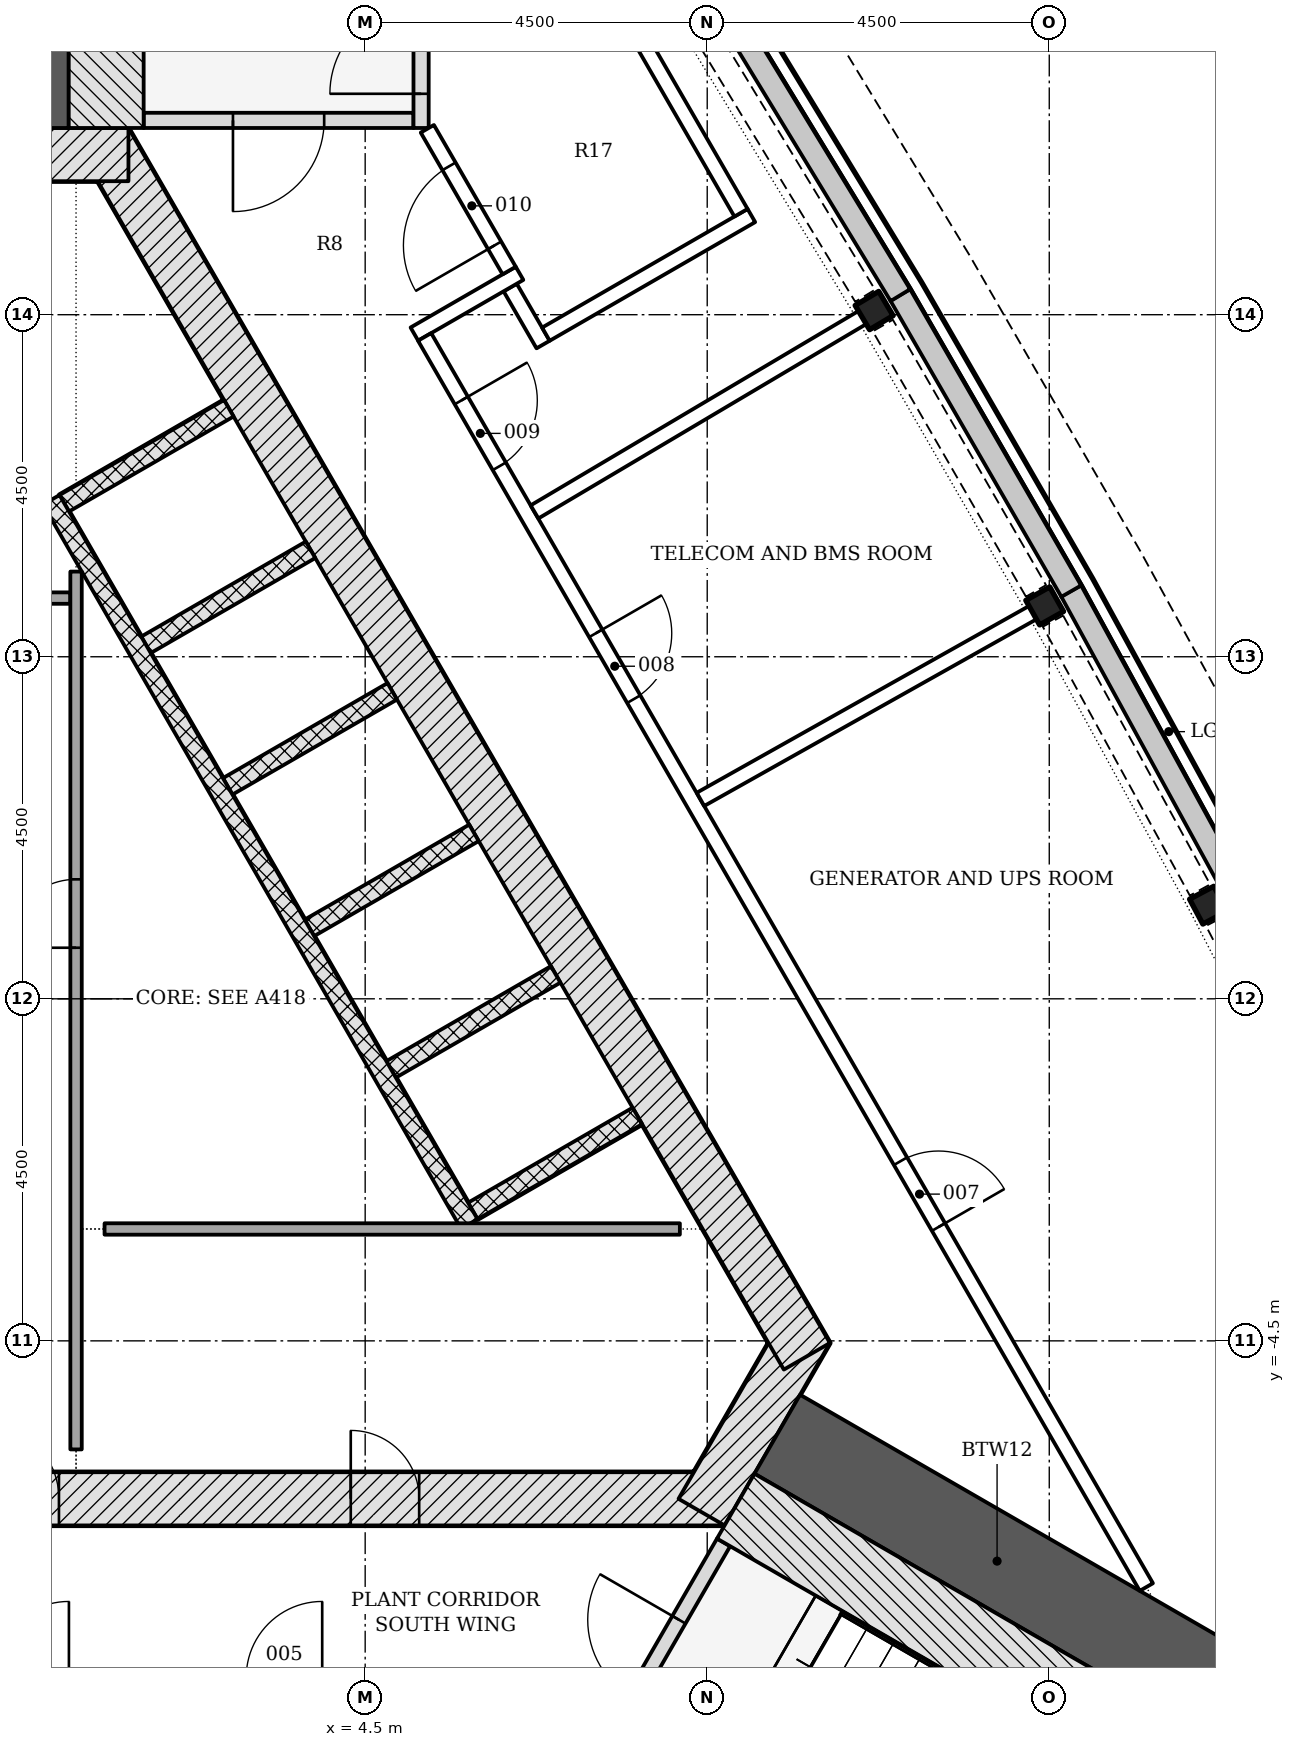
"""IFC4 building model, lengths in metres.
Left out: names, types, materials, properties, quantities, classifications, styles, units other than length and angle.
Written with IfcOpenShell. Run it as: python <this file> out.ifc"""

import sys

from ifc_helpers import new_model, si_unit, direction, frame, frame_2d, origin, origin_2d, place, context, subcontext, project, spatial, polyline, rectangle, i_section, outline, extrude, element, fill, save


model = new_model("IFC4")
c1 = context("Model", 3, precision=1e-05, world=origin(), true_north=direction((0.0, 1.0)))
c2 = subcontext(c1, "Body", "Model", "MODEL_VIEW")
j1 = project(units=[si_unit("LENGTHUNIT", "METRE"), si_unit("PLANEANGLEUNIT", "RADIAN")], contexts=[c1])
p1 = place(None, origin())
s1 = spatial("IfcSite", under=j1, at=p1, CompositionType="ELEMENT")
p2 = place(p1, origin())
s2 = spatial("IfcBuilding", under=s1, at=p2, CompositionType="ELEMENT")
p3 = place(p2, frame((0.0, 0.0, 258.0)))
s3 = spatial("IfcBuildingStorey", under=s2, at=p3, CompositionType="ELEMENT", Elevation=258.0)
p4 = place(p3, frame((-9.229, -6.578, -0.3), z_axis=(0.0, 0.0, 1.0), x_axis=(1.0, 0.0, 0.0)))
e1 = element("IfcWall", 1, at=p4, inside=s3, PredefinedType="SHEAR", context=c2, shape_type="SweptSolid", body=[
    extrude(rectangle(XDim=18.458, YDim=0.7, at=frame_2d((9.229, 0.0))), origin(), (0.0, 0.0, 1.0), 5.5),
])
p5 = place(p4, frame((8.7, 0.0, 0.3)))
e2 = element("IfcOpeningElement", 2, at=p5, cuts=e1, PredefinedType="OPENING", context=c2, shape_type="SweptSolid", body=[
    extrude(rectangle(XDim=1.0, YDim=2.1, at=frame_2d((0.5, 1.05))), frame((0.0, 0.36, 0.0), z_axis=(0.0, -1.0, 0.0), x_axis=(1.0, 0.0, 0.0)), (0.0, 0.0, 1.0), 0.72),
])
p6 = place(p4, frame((3.99, 0.0, 0.3)))
e3 = element("IfcOpeningElement", 3, at=p6, cuts=e1, PredefinedType="OPENING", context=c2, shape_type="SweptSolid", body=[
    extrude(rectangle(XDim=0.9, YDim=2.1, at=frame_2d((0.45, 1.05))), frame((0.0, 0.36, 0.0), z_axis=(0.0, -1.0, 0.0), x_axis=(1.0, 0.0, 0.0)), (0.0, 0.0, 1.0), 0.72),
])
p7 = place(p4, frame((13.539, 0.0, 0.3)))
e4 = element("IfcOpeningElement", 4, at=p7, cuts=e1, PredefinedType="OPENING", context=c2, shape_type="SweptSolid", body=[
    extrude(rectangle(XDim=0.9, YDim=2.1, at=frame_2d((0.45, 1.05))), frame((0.0, 0.36, 0.0), z_axis=(0.0, -1.0, 0.0), x_axis=(1.0, 0.0, 0.0)), (0.0, 0.0, 1.0), 0.72),
])
p8 = place(p3, frame((8.926, -6.753, -0.3), z_axis=(0.0, 0.0, 1.0), x_axis=(0.500042739161, 0.866000726912, 0.0)))
e5 = element("IfcWall", 5, at=p8, inside=s3, PredefinedType="SHEAR", context=c2, shape_type="SweptSolid", body=[
    extrude(rectangle(XDim=2.771, YDim=0.7, at=frame_2d((1.386, 0.0))), origin(), (0.0, 0.0, 1.0), 5.5),
])
p9 = place(p3, frame((10.311, -4.703, -0.3), z_axis=(0.0, 0.0, 1.0), x_axis=(-0.500001446645, 0.866024568562, 0.0)))
e6 = element("IfcWall", 6, at=p9, inside=s3, PredefinedType="SHEAR", context=c2, shape_type="SweptSolid", body=[
    extrude(rectangle(XDim=18.458, YDim=0.7, at=frame_2d((9.229, 0.0))), origin(), (0.0, 0.0, 1.0), 5.5),
])
p10 = place(p3, frame((1.386, 11.106, -0.3), z_axis=(0.0, 0.0, 1.0), x_axis=(-1.0, 0.0, 0.0)))
e7 = element("IfcWall", 7, at=p10, inside=s3, PredefinedType="SHEAR", context=c2, shape_type="SweptSolid", body=[
    extrude(rectangle(XDim=2.771, YDim=0.7, at=frame_2d((1.386, 0.0))), origin(), (0.0, 0.0, 1.0), 5.5),
])
p11 = place(p3, frame((0.0, 11.456, -0.3), z_axis=(0.0, 0.0, 1.0), x_axis=(0.0, 1.0, 0.0)))
e8 = element("IfcWall", 8, at=p11, inside=s3, PredefinedType="SHEAR", context=c2, shape_type="SweptSolid", body=[
    extrude(rectangle(XDim=6.679, YDim=1.2, at=frame_2d((3.339, 0.0))), origin(), (0.0, 0.0, 1.0), 5.5),
])
p12 = place(p3, frame((9.922, -5.728, -0.3), z_axis=(0.0, 0.0, 1.0), x_axis=(0.866032176823, -0.499988268569, 0.0)))
e9 = element("IfcWall", 9, at=p12, inside=s3, PredefinedType="SHEAR", context=c2, shape_type="SweptSolid", body=[
    extrude(rectangle(XDim=6.678, YDim=1.2, at=frame_2d((3.339, 0.0))), origin(), (0.0, 0.0, 1.0), 5.5),
])
p13 = place(p3, frame((16.745, -9.667, -0.3), z_axis=(0.0, 0.0, 1.0), x_axis=(0.866025403784, -0.5, 0.0)))
e10 = element("IfcColumn", 10, at=p13, inside=s3, PredefinedType="COLUMN", context=c2, shape_type="SweptSolid", body=[
    extrude(rectangle(XDim=2.4, YDim=2.4, at=origin_2d()), origin(), (0.0, 0.0, 1.0), 5.5),
])
for number, where, z_axis, x_axis in (
    (11, (15.593, 1.232, -0.3), (0.0, 0.0, 1.0), (-0.47, 0.883, 0.0)),
    (12, (13.44, 5.169, -0.3), (0.0, 0.0, 1.0), (-0.49, 0.872, 0.0)),
    (13, (11.196, 9.055, -0.3), (0.0, 0.0, 1.0), (-0.51, 0.86, 0.0)),
):
    element("IfcColumn", number, at=place(p3, frame(where, z_axis=z_axis, x_axis=x_axis)), inside=s3, PredefinedType="COLUMN", context=c2, shape_type="SweptSolid", body=[
        extrude(i_section(OverallWidth=0.371, OverallDepth=0.361, WebThickness=0.012, FlangeThickness=0.02, FilletRadius=0.015, at=origin_2d()), origin(), (0.0, 0.0, 1.0), 5.5),
    ])
p14 = place(p3, origin())
e14 = element("IfcWall", 14, at=p14, inside=s3, PredefinedType="NOTDEFINED", context=c2, shape_type="SweptSolid", body=[
    extrude(outline(polyline([(16.078, 1.49), (13.919, 5.438), (13.656, 5.294), (15.815, 1.346), (16.078, 1.49)])), origin(), (0.0, 0.0, 1.0), 1.2),
])
p15 = place(p3, origin())
e15 = element("IfcWall", 15, at=p15, inside=s3, PredefinedType="NOTDEFINED", context=c2, shape_type="SweptSolid", body=[
    extrude(outline(polyline([(13.919, 5.438), (11.669, 9.335), (11.409, 9.185), (13.659, 5.288), (13.919, 5.438)])), origin(), (0.0, 0.0, 1.0), 1.2),
])
p16 = place(p3, origin())
e16 = element("IfcWall", 16, at=p16, inside=s3, PredefinedType="NOTDEFINED", context=c2, shape_type="SweptSolid", body=[
    extrude(outline(polyline([(11.669, 9.335), (9.33, 13.179), (9.073, 13.023), (11.413, 9.179), (11.669, 9.335)])), origin(), (0.0, 0.0, 1.0), 1.2),
])
p17 = place(p3, origin())
e17 = element("IfcWall", 17, at=p17, inside=s3, PredefinedType="NOTDEFINED", context=c2, shape_type="SweptSolid", body=[
    extrude(outline(polyline([(11.244, -14.46), (13.211, -14.336), (14.708, -14.069), (16.111, -13.485), (17.355, -12.611), (18.381, -11.49), (19.141, -10.174), (19.599, -8.724), (19.733, -7.21), (19.538, -5.703), (19.021, -4.273), (18.145, -2.507), (17.876, -2.64), (18.745, -4.391), (19.244, -5.774), (19.432, -7.216), (19.303, -8.665), (18.865, -10.052), (18.138, -11.312), (17.156, -12.385), (15.965, -13.22), (14.623, -13.779), (13.176, -14.038), (11.225, -14.161), (11.244, -14.46)])), origin(), (0.0, 0.0, 1.0), 5.2),
])
for number, where, z_axis, x_axis in (
    (18, (8.081, -1.541, -0.3), (0.0, 0.0, 1.0), (-0.866, -0.5, 0.0)),
    (19, (7.006, 0.321, -0.3), (0.0, 0.0, 1.0), (-0.866, -0.5, 0.0)),
):
    element("IfcWall", number, at=place(p3, frame(where, z_axis=z_axis, x_axis=x_axis)), inside=s3, PredefinedType="PARTITIONING", context=c2, shape_type="SweptSolid", body=[
        extrude(rectangle(XDim=2.5, YDim=0.25, at=frame_2d((1.25, 0.0))), origin(), (0.0, 0.0, 1.0), 5.5),
    ])
p18 = place(p3, frame((5.931, 2.183, -0.3), z_axis=(0.0, 0.0, 1.0), x_axis=(-0.866047370643, -0.499961950354, 0.0)))
e20 = element("IfcWall", 20, at=p18, inside=s3, PredefinedType="PARTITIONING", context=c2, shape_type="SweptSolid", body=[
    extrude(rectangle(XDim=2.5, YDim=0.25, at=frame_2d((1.25, 0.0))), origin(), (0.0, 0.0, 1.0), 5.5),
])
for number, where, z_axis, x_axis in (
    (21, (4.856, 4.045, -0.3), (0.0, 0.0, 1.0), (-0.866, -0.5, 0.0)),
    (22, (3.781, 5.907, -0.3), (0.0, 0.0, 1.0), (-0.866, -0.5, 0.0)),
    (23, (2.706, 7.769, -0.3), (0.0, 0.0, 1.0), (-0.866, -0.5, 0.0)),
):
    element("IfcWall", number, at=place(p3, frame(where, z_axis=z_axis, x_axis=x_axis)), inside=s3, PredefinedType="PARTITIONING", context=c2, shape_type="SweptSolid", body=[
        extrude(rectangle(XDim=2.5, YDim=0.25, at=frame_2d((1.25, 0.0))), origin(), (0.0, 0.0, 1.0), 5.5),
    ])
p19 = place(p3, frame((5.87, -2.961, 0.0), z_axis=(0.0, 0.0, 1.0), x_axis=(-0.50000615651, 0.866021849293, 0.0)))
e24 = element("IfcWall", 24, at=p19, inside=s3, PredefinedType="PARTITIONING", context=c2, shape_type="SweptSolid", body=[
    extrude(rectangle(XDim=11.0, YDim=0.25, at=frame_2d((5.5, 0.0))), origin(), (0.0, 0.0, 1.0), 5.2),
])
p20 = place(p3, frame((-0.679, 5.272, 0.0), z_axis=(0.0, 0.0, 1.0), x_axis=(1.0, 0.0, 0.0)))
e25 = element("IfcWall", 25, at=p20, inside=s3, PredefinedType="PARTITIONING", context=c2, shape_type="SweptSolid", body=[
    extrude(rectangle(XDim=1.3, YDim=0.15, at=frame_2d((0.65, 0.0))), origin(), (0.0, 0.0, 1.0), 5.2),
])
p21 = place(p3, frame((0.696, -5.928, 0.0), z_axis=(0.0, 0.0, 1.0), x_axis=(0.0, 1.0, 0.0)))
e26 = element("IfcWall", 26, at=p21, inside=s3, PredefinedType="PARTITIONING", context=c2, shape_type="SweptSolid", body=[
    extrude(rectangle(XDim=11.549, YDim=0.15, at=frame_2d((5.774, 0.0))), origin(), (0.0, 0.0, 1.0), 5.2),
])
p22 = place(p21, frame((6.6, 0.0, 0.0)))
e27 = element("IfcOpeningElement", 27, at=p22, cuts=e26, PredefinedType="OPENING", context=c2, shape_type="SweptSolid", body=[
    extrude(rectangle(XDim=0.9, YDim=2.1, at=frame_2d((0.45, 1.05))), frame((0.0, 0.085, 0.0), z_axis=(0.0, -1.0, 0.0), x_axis=(1.0, 0.0, 0.0)), (0.0, 0.0, 1.0), 0.17),
])
p23 = place(p3, frame((1.071, -3.028, 0.0), z_axis=(0.0, 0.0, 1.0), x_axis=(1.0, 0.0, 0.0)))
e28 = element("IfcWall", 28, at=p23, inside=s3, PredefinedType="PARTITIONING", context=c2, shape_type="SweptSolid", body=[
    extrude(rectangle(XDim=7.569, YDim=0.15, at=frame_2d((3.784, 0.0))), origin(), (0.0, 0.0, 1.0), 5.2),
])
p24 = place(p3, frame((5.135, 11.556, -0.3), z_axis=(0.0, 0.0, 1.0), x_axis=(-1.0, 0.0, 0.0)))
e29 = element("IfcWall", 29, at=p24, inside=s3, PredefinedType="SHEAR", context=c2, shape_type="SweptSolid", body=[
    extrude(rectangle(XDim=3.55, YDim=0.2, at=frame_2d((1.775, 0.0))), origin(), (0.0, 0.0, 1.0), 5.5),
])
p25 = place(p24, frame((1.175, 0.0, 0.3)))
e30 = element("IfcOpeningElement", 30, at=p25, cuts=e29, PredefinedType="OPENING", context=c2, shape_type="SweptSolid", body=[
    extrude(rectangle(XDim=1.2, YDim=2.1, at=frame_2d((0.6, 1.05))), frame((0.0, 0.11, 0.0), z_axis=(0.0, -1.0, 0.0), x_axis=(1.0, 0.0, 0.0)), (0.0, 0.0, 1.0), 0.22),
])
p26 = place(p3, frame((5.236, 11.456, -0.3), z_axis=(0.0, 0.0, 1.0), x_axis=(0.0, 1.0, 0.0)))
e31 = element("IfcWall", 31, at=p26, inside=s3, PredefinedType="SHEAR", context=c2, shape_type="SweptSolid", body=[
    extrude(rectangle(XDim=5.6, YDim=0.2, at=frame_2d((2.8, 0.0))), origin(), (0.0, 0.0, 1.0), 5.5),
])
p27 = place(p26, frame((0.45, 0.0, 0.3)))
e32 = element("IfcOpeningElement", 32, at=p27, cuts=e31, PredefinedType="OPENING", context=c2, shape_type="SweptSolid", body=[
    extrude(rectangle(XDim=1.2, YDim=2.1, at=frame_2d((0.6, 1.05))), frame((0.0, 0.11, 0.0), z_axis=(0.0, -1.0, 0.0), x_axis=(1.0, 0.0, 0.0)), (0.0, 0.0, 1.0), 0.22),
])
p28 = place(p3, frame((1.093, 11.456, -0.3), z_axis=(0.0, 0.0, 1.0), x_axis=(0.0, 1.0, 0.0)))
e33 = element("IfcWall", 33, at=p28, inside=s3, PredefinedType="SHEAR", context=c2, shape_type="SweptSolid", body=[
    extrude(rectangle(XDim=6.679, YDim=0.986, at=frame_2d((3.339, 0.0))), origin(), (0.0, 0.0, 1.0), 5.5),
])
p29 = place(p3, frame((7.44, -10.226, -0.3), z_axis=(0.0, 0.0, 1.0), x_axis=(0.500022077904, 0.866012656725, 0.0)))
e34 = element("IfcWall", 34, at=p29, inside=s3, PredefinedType="SHEAR", context=c2, shape_type="SweptSolid", body=[
    extrude(rectangle(XDim=3.55, YDim=0.2, at=frame_2d((1.775, 0.0))), origin(), (0.0, 0.0, 1.0), 5.5),
])
p30 = place(p29, frame((1.175, 0.0, 0.3)))
e35 = element("IfcOpeningElement", 35, at=p30, cuts=e34, PredefinedType="OPENING", context=c2, shape_type="SweptSolid", body=[
    extrude(rectangle(XDim=1.2, YDim=2.1, at=frame_2d((0.6, 1.05))), frame((0.0, 0.11, 0.0), z_axis=(0.0, -1.0, 0.0), x_axis=(1.0, 0.0, 0.0)), (0.0, 0.0, 1.0), 0.22),
])
p31 = place(p3, frame((9.375, -6.675, -0.3), z_axis=(0.0, 0.0, 1.0), x_axis=(0.866025486527, -0.499999856685, 0.0)))
e36 = element("IfcWall", 36, at=p31, inside=s3, PredefinedType="SHEAR", context=c2, shape_type="SweptSolid", body=[
    extrude(rectangle(XDim=6.679, YDim=0.986, at=frame_2d((3.339, 0.0))), origin(), (0.0, 0.0, 1.0), 5.5),
])
p32 = place(p3, frame((6.408, 9.358, 0.0), z_axis=(0.0, 0.0, 1.0), x_axis=(0.499958279983, -0.866049489508, 0.0)))
e37 = element("IfcWall", 37, at=p32, inside=s3, PredefinedType="PARTITIONING", context=c2, shape_type="SweptSolid", body=[
    extrude(rectangle(XDim=0.866, YDim=0.2, at=frame_2d((0.433, 0.0))), origin(), (0.0, 0.0, 1.0), 5.2),
])
p33 = place(p3, frame((5.147, 8.745, 0.0), z_axis=(0.0, 0.0, 1.0), x_axis=(0.865987117328, 0.500066308224, 0.0)))
e38 = element("IfcWall", 38, at=p33, inside=s3, PredefinedType="PARTITIONING", context=c2, shape_type="SweptSolid", body=[
    extrude(rectangle(XDim=1.598, YDim=0.2, at=frame_2d((0.799, 0.0))), origin(), (0.0, 0.0, 1.0), 5.2),
])
p34 = place(p3, frame((6.395, 9.581, 0.0), z_axis=(0.0, 0.0, 1.0), x_axis=(-0.500003735859, 0.866023246874, 0.0)))
e39 = element("IfcWall", 39, at=p34, inside=s3, PredefinedType="PARTITIONING", context=c2, shape_type="SweptSolid", body=[
    extrude(rectangle(XDim=2.154, YDim=0.2, at=frame_2d((1.077, 0.0))), origin(), (0.0, 0.0, 1.0), 4.652),
])
p35 = place(p34, frame((0.383, 0.0, 0.0)))
e40 = element("IfcOpeningElement", 40, at=p35, cuts=e39, PredefinedType="OPENING", context=c2, shape_type="SweptSolid", body=[
    extrude(rectangle(XDim=1.2, YDim=2.1, at=frame_2d((0.6, 1.05))), frame((0.0, 0.11, 0.0), z_axis=(0.0, -1.0, 0.0), x_axis=(1.0, 0.0, 0.0)), (0.0, 0.0, 1.0), 0.22),
])
p36 = place(p3, frame((5.282, 8.708, 0.0), z_axis=(0.0, 0.0, 1.0), x_axis=(0.500007704848, -0.866020955343, 0.0)))
e41 = element("IfcWall", 41, at=p36, inside=s3, PredefinedType="PARTITIONING", context=c2, shape_type="SweptSolid", body=[
    extrude(rectangle(XDim=18.991, YDim=0.2, at=frame_2d((9.496, 0.0))), origin(), (0.0, 0.0, 1.0), 4.652),
])
p37 = place(p36, frame((12.521, 0.0, 0.0)))
e42 = element("IfcOpeningElement", 42, at=p37, cuts=e41, PredefinedType="OPENING", context=c2, shape_type="SweptSolid", body=[
    extrude(rectangle(XDim=1.0, YDim=2.1, at=frame_2d((0.5, 1.05))), frame((0.0, 0.11, 0.0), z_axis=(0.0, -1.0, 0.0), x_axis=(1.0, 0.0, 0.0)), (0.0, 0.0, 1.0), 0.22),
])
p38 = place(p36, frame((4.502, 0.0, 0.0)))
e43 = element("IfcOpeningElement", 43, at=p38, cuts=e41, PredefinedType="OPENING", context=c2, shape_type="SweptSolid", body=[
    extrude(rectangle(XDim=1.0, YDim=2.1, at=frame_2d((0.5, 1.05))), frame((0.0, 0.11, 0.0), z_axis=(0.0, -1.0, 0.0), x_axis=(1.0, 0.0, 0.0)), (0.0, 0.0, 1.0), 0.22),
])
p39 = place(p36, frame((0.965, 0.0, 0.0)))
e44 = element("IfcOpeningElement", 44, at=p39, cuts=e41, PredefinedType="OPENING", context=c2, shape_type="SweptSolid", body=[
    extrude(rectangle(XDim=1.0, YDim=2.1, at=frame_2d((0.5, 1.05))), frame((0.0, 0.11, 0.0), z_axis=(0.0, -1.0, 0.0), x_axis=(1.0, 0.0, 0.0)), (0.0, 0.0, 1.0), 0.22),
])
for number, where, z_axis, x_axis in (
    (45, (8.911, 2.624, 0.0), (0.0, 0.0, 1.0), (0.872, 0.49, 0.0)),
    (46, (6.728, 6.406, 0.0), (0.0, 0.0, 1.0), (0.86, 0.51, 0.0)),
):
    element("IfcWall", number, at=place(p3, frame(where, z_axis=z_axis, x_axis=x_axis)), inside=s3, PredefinedType="PARTITIONING", context=c2, shape_type="SweptSolid", body=[
        extrude(rectangle(XDim=5.044, YDim=0.2, at=frame_2d((2.522, 0.0))), origin(), (0.0, 0.0, 1.0), 4.652),
    ])
p40 = place(p3, frame((6.878, 8.744, 0.0), z_axis=(0.0, 0.0, 1.0), x_axis=(0.866025387892, 0.500000027526, 0.0)))
e47 = element("IfcWall", 47, at=p40, inside=s3, PredefinedType="PARTITIONING", context=c2, shape_type="SweptSolid", body=[
    extrude(rectangle(XDim=3.122, YDim=0.2, at=frame_2d((1.561, 0.0))), origin(), (0.0, 0.0, 1.0), 5.2),
])
p41 = place(p3, frame((9.445, 10.341, 0.0), z_axis=(0.0, 0.0, 1.0), x_axis=(-0.499996461177, 0.866027446915, 0.0)))
e48 = element("IfcWall", 48, at=p41, inside=s3, PredefinedType="PARTITIONING", context=c2, shape_type="SweptSolid", body=[
    extrude(rectangle(XDim=5.759, YDim=0.2, at=frame_2d((2.879, 0.0))), origin(), (0.0, 0.0, 1.0), 4.652),
])
p42 = place(p5, origin())
e49 = element("IfcDoor", 49, at=p42, inside=s3, OperationType="SINGLE_SWING_LEFT", PredefinedType="DOOR", context=c2, shape_type="SweptSolid", body=[
    extrude(rectangle(XDim=1.0, YDim=2.1, at=frame_2d((0.5, 1.05))), frame((0.0, 0.075, 0.0), z_axis=(0.0, -1.0, 0.0), x_axis=(1.0, 0.0, 0.0)), (0.0, 0.0, 1.0), 0.15),
])
fill(e2, e49)
p43 = place(p7, origin())
e50 = element("IfcDoor", 50, at=p43, inside=s3, OperationType="SINGLE_SWING_LEFT", PredefinedType="DOOR", context=c2, shape_type="SweptSolid", body=[
    extrude(rectangle(XDim=0.9, YDim=2.1, at=frame_2d((0.45, 1.05))), frame((0.0, 0.075, 0.0), z_axis=(0.0, -1.0, 0.0), x_axis=(1.0, 0.0, 0.0)), (0.0, 0.0, 1.0), 0.15),
])
fill(e4, e50)
p44 = place(p22, origin())
e51 = element("IfcDoor", 51, at=p44, inside=s3, OperationType="SINGLE_SWING_LEFT", PredefinedType="DOOR", context=c2, shape_type="SweptSolid", body=[
    extrude(rectangle(XDim=0.9, YDim=2.1, at=frame_2d((0.45, 1.05))), frame((0.0, 0.025, 0.0), z_axis=(0.0, -1.0, 0.0), x_axis=(1.0, 0.0, 0.0)), (0.0, 0.0, 1.0), 0.05),
])
fill(e27, e51)
p45 = place(p25, origin())
e52 = element("IfcDoor", 52, at=p45, inside=s3, OperationType="SINGLE_SWING_RIGHT", PredefinedType="DOOR", context=c2, shape_type="SweptSolid", body=[
    extrude(rectangle(XDim=1.2, YDim=2.1, at=frame_2d((0.6, 1.05))), frame((0.0, 0.025, 0.0), z_axis=(0.0, -1.0, 0.0), x_axis=(1.0, 0.0, 0.0)), (0.0, 0.0, 1.0), 0.05),
])
fill(e30, e52)
p46 = place(p27, origin())
e53 = element("IfcDoor", 53, at=p46, inside=s3, OperationType="SINGLE_SWING_LEFT", PredefinedType="DOOR", context=c2, shape_type="SweptSolid", body=[
    extrude(rectangle(XDim=1.2, YDim=2.1, at=frame_2d((0.6, 1.05))), frame((0.0, 0.025, 0.0), z_axis=(0.0, -1.0, 0.0), x_axis=(1.0, 0.0, 0.0)), (0.0, 0.0, 1.0), 0.05),
])
fill(e32, e53)
p47 = place(p30, origin())
e54 = element("IfcDoor", 54, at=p47, inside=s3, OperationType="SINGLE_SWING_RIGHT", PredefinedType="DOOR", context=c2, shape_type="SweptSolid", body=[
    extrude(rectangle(XDim=1.2, YDim=2.1, at=frame_2d((0.6, 1.05))), frame((0.0, 0.025, 0.0), z_axis=(0.0, -1.0, 0.0), x_axis=(1.0, 0.0, 0.0)), (0.0, 0.0, 1.0), 0.05),
])
fill(e35, e54)
p48 = place(p37, origin())
e55 = element("IfcDoor", 55, at=p48, inside=s3, OperationType="SINGLE_SWING_RIGHT", PredefinedType="DOOR", context=c2, shape_type="SweptSolid", body=[
    extrude(rectangle(XDim=1.0, YDim=2.1, at=frame_2d((0.5, 1.05))), frame((0.0, 0.025, 0.0), z_axis=(0.0, -1.0, 0.0), x_axis=(1.0, 0.0, 0.0)), (0.0, 0.0, 1.0), 0.05),
])
fill(e42, e55)
p49 = place(p38, origin())
e56 = element("IfcDoor", 56, at=p49, inside=s3, OperationType="SINGLE_SWING_LEFT", PredefinedType="DOOR", context=c2, shape_type="SweptSolid", body=[
    extrude(rectangle(XDim=1.0, YDim=2.1, at=frame_2d((0.5, 1.05))), frame((0.0, 0.025, 0.0), z_axis=(0.0, -1.0, 0.0), x_axis=(1.0, 0.0, 0.0)), (0.0, 0.0, 1.0), 0.05),
])
fill(e43, e56)
p50 = place(p39, origin())
e57 = element("IfcDoor", 57, at=p50, inside=s3, OperationType="SINGLE_SWING_LEFT", PredefinedType="DOOR", context=c2, shape_type="SweptSolid", body=[
    extrude(rectangle(XDim=1.0, YDim=2.1, at=frame_2d((0.5, 1.05))), frame((0.0, 0.025, 0.0), z_axis=(0.0, -1.0, 0.0), x_axis=(1.0, 0.0, 0.0)), (0.0, 0.0, 1.0), 0.05),
])
fill(e44, e57)
p51 = place(p35, origin())
e58 = element("IfcDoor", 58, at=p51, inside=s3, OperationType="SINGLE_SWING_LEFT", PredefinedType="DOOR", context=c2, shape_type="SweptSolid", body=[
    extrude(rectangle(XDim=1.2, YDim=2.1, at=frame_2d((0.6, 1.05))), frame((0.0, 0.025, 0.0), z_axis=(0.0, -1.0, 0.0), x_axis=(1.0, 0.0, 0.0)), (0.0, 0.0, 1.0), 0.05),
])
fill(e40, e58)
save(model, sys.argv[1])
